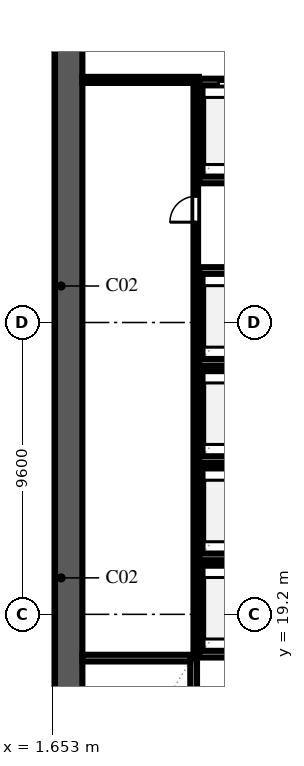
"""IFC4 building model, lengths in metres.
Left out: names, types, materials, properties, quantities, classifications, styles, units other than length and angle.
Written with IfcOpenShell. Run it as: python <this file> out.ifc"""

import sys

from ifc_helpers import new_model, si_unit, direction, frame, frame_2d, origin, place, context, subcontext, project, spatial, rectangle, extrude, element, fill, save


model = new_model("IFC4")
c1 = context("Model", 3, precision=1e-05, world=origin(), true_north=direction((0.0, 1.0)))
c2 = subcontext(c1, "Body", "Model", "MODEL_VIEW")
j1 = project(units=[si_unit("LENGTHUNIT", "METRE"), si_unit("PLANEANGLEUNIT", "RADIAN")], contexts=[c1])
p1 = place(None, origin())
s1 = spatial("IfcSite", under=j1, at=p1, CompositionType="ELEMENT")
p2 = place(p1, origin())
s2 = spatial("IfcBuilding", under=s1, at=p2, CompositionType="ELEMENT")
p3 = place(p2, frame((0.0, 0.0, 31.8)))
s3 = spatial("IfcBuildingStorey", under=s2, at=p3, CompositionType="ELEMENT", Elevation=31.8)
p4 = place(p3, frame((2.2, 9.15, 0.0), z_axis=(0.0, 0.0, 1.0), x_axis=(0.0, 1.0, 0.0)))
e1 = element("IfcWall", 1, at=p4, inside=s3, PredefinedType="SHEAR", context=c2, shape_type="SweptSolid", body=[
    extrude(rectangle(XDim=39.3, YDim=0.9, at=frame_2d((19.65, 0.0))), origin(), (0.0, 0.0, 1.0), 3.54),
])
p5 = place(p3, frame((6.31, 9.95, 0.0), z_axis=(0.0, 0.0, 1.0), x_axis=(0.0, 1.0, 0.0)))
e2 = element("IfcWall", 2, at=p5, inside=s3, PredefinedType="SOLIDWALL", context=c2, shape_type="SweptSolid", body=[
    extrude(rectangle(XDim=7.81, YDim=0.22, at=frame_2d((3.905, 0.0))), origin(), (0.0, 0.0, 1.0), 3.54),
])
p6 = place(p5, frame((0.14, 0.0, 0.0)))
e3 = element("IfcOpeningElement", 3, at=p6, cuts=e2, PredefinedType="OPENING", context=c2, shape_type="SweptSolid", body=[
    extrude(rectangle(XDim=1.1, YDim=2.2, at=frame_2d((0.55, 1.1))), frame((0.0, 0.122, 0.0), z_axis=(0.0, -1.0, 0.0), x_axis=(1.0, 0.0, 0.0)), (0.0, 0.0, 1.0), 0.244),
])
p7 = place(p3, frame((2.65, 17.76, 0.0), z_axis=(0.0, 0.0, 1.0), x_axis=(1.0, 0.0, 0.0)))
e4 = element("IfcWall", 4, at=p7, inside=s3, PredefinedType="SOLIDWALL", context=c2, shape_type="SweptSolid", body=[
    extrude(rectangle(XDim=3.55, YDim=0.22, at=frame_2d((1.775, 0.0))), origin(), (0.0, 0.0, 1.0), 3.54),
])
p8 = place(p3, frame((6.49, 18.11, 0.0), z_axis=(0.0, 0.0, 1.0), x_axis=(0.0, 1.0, 0.0)))
e5 = element("IfcWall", 5, at=p8, inside=s3, PredefinedType="SOLIDWALL", context=c2, shape_type="SweptSolid", body=[
    extrude(rectangle(XDim=2.58, YDim=0.22, at=frame_2d((1.29, 0.0))), origin(), (0.0, 0.0, 1.0), 3.54),
])
for number, where, z_axis, x_axis in (
    (6, (6.49, 17.89, 0.0), (0.0, 0.0, 1.0), (1.0, 0.0, 0.0)),
    (7, (6.49, 20.91, 0.0), (0.0, 0.0, 1.0), (1.0, 0.0, 0.0)),
):
    element("IfcWall", number, at=place(p3, frame(where, z_axis=z_axis, x_axis=x_axis)), inside=s3, PredefinedType="SOLIDWALL", context=c2, shape_type="SweptSolid", body=[
        extrude(rectangle(XDim=2.47, YDim=0.22, at=frame_2d((1.235, 0.0))), origin(), (0.0, 0.0, 1.0), 3.54),
    ])
p9 = place(p3, frame((6.49, 21.31, 0.0), z_axis=(0.0, 0.0, 1.0), x_axis=(0.0, 1.0, 0.0)))
e8 = element("IfcWall", 8, at=p9, inside=s3, PredefinedType="SOLIDWALL", context=c2, shape_type="SweptSolid", body=[
    extrude(rectangle(XDim=2.58, YDim=0.22, at=frame_2d((1.29, 0.0))), origin(), (0.0, 0.0, 1.0), 3.54),
])
for number, where, z_axis, x_axis in (
    (9, (6.49, 21.09, 0.0), (0.0, 0.0, 1.0), (1.0, 0.0, 0.0)),
    (10, (6.49, 24.11, 0.0), (0.0, 0.0, 1.0), (1.0, 0.0, 0.0)),
):
    element("IfcWall", number, at=place(p3, frame(where, z_axis=z_axis, x_axis=x_axis)), inside=s3, PredefinedType="SOLIDWALL", context=c2, shape_type="SweptSolid", body=[
        extrude(rectangle(XDim=2.47, YDim=0.22, at=frame_2d((1.235, 0.0))), origin(), (0.0, 0.0, 1.0), 3.54),
    ])
p10 = place(p3, frame((6.49, 24.51, 0.0), z_axis=(0.0, 0.0, 1.0), x_axis=(0.0, 1.0, 0.0)))
e11 = element("IfcWall", 11, at=p10, inside=s3, PredefinedType="SOLIDWALL", context=c2, shape_type="SweptSolid", body=[
    extrude(rectangle(XDim=2.58, YDim=0.22, at=frame_2d((1.29, 0.0))), origin(), (0.0, 0.0, 1.0), 3.54),
])
for number, where, z_axis, x_axis in (
    (12, (6.49, 24.29, 0.0), (0.0, 0.0, 1.0), (1.0, 0.0, 0.0)),
    (13, (6.49, 27.31, 0.0), (0.0, 0.0, 1.0), (1.0, 0.0, 0.0)),
):
    element("IfcWall", number, at=place(p3, frame(where, z_axis=z_axis, x_axis=x_axis)), inside=s3, PredefinedType="SOLIDWALL", context=c2, shape_type="SweptSolid", body=[
        extrude(rectangle(XDim=2.47, YDim=0.22, at=frame_2d((1.235, 0.0))), origin(), (0.0, 0.0, 1.0), 3.54),
    ])
p11 = place(p3, frame((6.49, 27.71, 0.0), z_axis=(0.0, 0.0, 1.0), x_axis=(0.0, 1.0, 0.0)))
e14 = element("IfcWall", 14, at=p11, inside=s3, PredefinedType="SOLIDWALL", context=c2, shape_type="SweptSolid", body=[
    extrude(rectangle(XDim=2.58, YDim=0.22, at=frame_2d((1.29, 0.0))), origin(), (0.0, 0.0, 1.0), 3.54),
])
for number, where, z_axis, x_axis in (
    (15, (6.49, 27.49, 0.0), (0.0, 0.0, 1.0), (1.0, 0.0, 0.0)),
    (16, (6.49, 30.51, 0.0), (0.0, 0.0, 1.0), (1.0, 0.0, 0.0)),
):
    element("IfcWall", number, at=place(p3, frame(where, z_axis=z_axis, x_axis=x_axis)), inside=s3, PredefinedType="SOLIDWALL", context=c2, shape_type="SweptSolid", body=[
        extrude(rectangle(XDim=2.47, YDim=0.22, at=frame_2d((1.235, 0.0))), origin(), (0.0, 0.0, 1.0), 3.54),
    ])
p12 = place(p3, frame((6.49, 33.71, 0.0), z_axis=(0.0, 0.0, 1.0), x_axis=(0.0, 1.0, 0.0)))
e17 = element("IfcWall", 17, at=p12, inside=s3, PredefinedType="SOLIDWALL", context=c2, shape_type="SweptSolid", body=[
    extrude(rectangle(XDim=2.78, YDim=0.22, at=frame_2d((1.39, 0.0))), origin(), (0.0, 0.0, 1.0), 3.54),
])
p13 = place(p3, frame((6.49, 33.49, 0.0), z_axis=(0.0, 0.0, 1.0), x_axis=(1.0, 0.0, 0.0)))
e18 = element("IfcWall", 18, at=p13, inside=s3, PredefinedType="SOLIDWALL", context=c2, shape_type="SweptSolid", body=[
    extrude(rectangle(XDim=2.47, YDim=0.22, at=frame_2d((1.235, 0.0))), origin(), (0.0, 0.0, 1.0), 3.54),
])
p14 = place(p3, frame((6.49, 36.71, 0.0), z_axis=(0.0, 0.0, 1.0), x_axis=(1.0, 0.0, 0.0)))
e19 = element("IfcWall", 19, at=p14, inside=s3, PredefinedType="SOLIDWALL", context=c2, shape_type="SweptSolid", body=[
    extrude(rectangle(XDim=2.47, YDim=0.22, at=frame_2d((1.235, 0.0))), origin(), (0.0, 0.0, 1.0), 3.54),
])
p15 = place(p14, frame((0.635, 0.0, 0.0)))
e20 = element("IfcOpeningElement", 20, at=p15, cuts=e19, PredefinedType="OPENING", context=c2, shape_type="SweptSolid", body=[
    extrude(rectangle(XDim=1.2, YDim=2.2, at=frame_2d((0.6, 1.1))), frame((0.0, 0.122, 0.0), z_axis=(0.0, -1.0, 0.0), x_axis=(1.0, 0.0, 0.0)), (0.0, 0.0, 1.0), 0.244),
])
p16 = place(p3, frame((2.65, 36.78, 0.0), z_axis=(0.0, 0.0, 1.0), x_axis=(1.0, 0.0, 0.0)))
e21 = element("IfcWall", 21, at=p16, inside=s3, PredefinedType="SOLIDWALL", context=c2, shape_type="SweptSolid", body=[
    extrude(rectangle(XDim=3.83, YDim=0.2, at=frame_2d((1.915, 0.0))), origin(), (0.0, 0.0, 1.0), 3.54),
])
p17 = place(p3, frame((6.38, 17.8, 0.0), z_axis=(0.0, 0.0, 1.0), x_axis=(0.0, 1.0, 0.0)))
e22 = element("IfcWall", 22, at=p17, inside=s3, PredefinedType="PARTITIONING", context=c2, shape_type="SweptSolid", body=[
    extrude(rectangle(XDim=18.98, YDim=0.15, at=frame_2d((9.49, 0.0))), origin(), (0.0, 0.0, 1.0), 3.54),
])
p18 = place(p17, frame((14.3, 0.0, 0.0)))
e23 = element("IfcOpeningElement", 23, at=p18, cuts=e22, PredefinedType="OPENING", context=c2, shape_type="SweptSolid", body=[
    extrude(rectangle(XDim=0.85, YDim=2.1, at=frame_2d((0.425, 1.05))), frame((0.0, 0.087, 0.0), z_axis=(0.0, -1.0, 0.0), x_axis=(1.0, 0.0, 0.0)), (0.0, 0.0, 1.0), 0.174),
])
p19 = place(p15, origin())
e24 = element("IfcDoor", 24, at=p19, inside=s3, OperationType="DOUBLE_DOOR_SLIDING", PredefinedType="DOOR", context=c2, shape_type="SweptSolid", body=[
    extrude(rectangle(XDim=1.2, YDim=2.2, at=frame_2d((0.6, 1.1))), frame((0.0, 0.025, 0.0), z_axis=(0.0, -1.0, 0.0), x_axis=(1.0, 0.0, 0.0)), (0.0, 0.0, 1.0), 0.05),
])
fill(e20, e24)
p20 = place(p18, origin())
e25 = element("IfcDoor", 25, at=p20, inside=s3, OperationType="SINGLE_SWING_LEFT", PredefinedType="DOOR", context=c2, shape_type="SweptSolid", body=[
    extrude(rectangle(XDim=0.85, YDim=2.1, at=frame_2d((0.425, 1.05))), frame((0.0, 0.025, 0.0), z_axis=(0.0, -1.0, 0.0), x_axis=(1.0, 0.0, 0.0)), (0.0, 0.0, 1.0), 0.05),
])
fill(e23, e25)
save(model, sys.argv[1])
